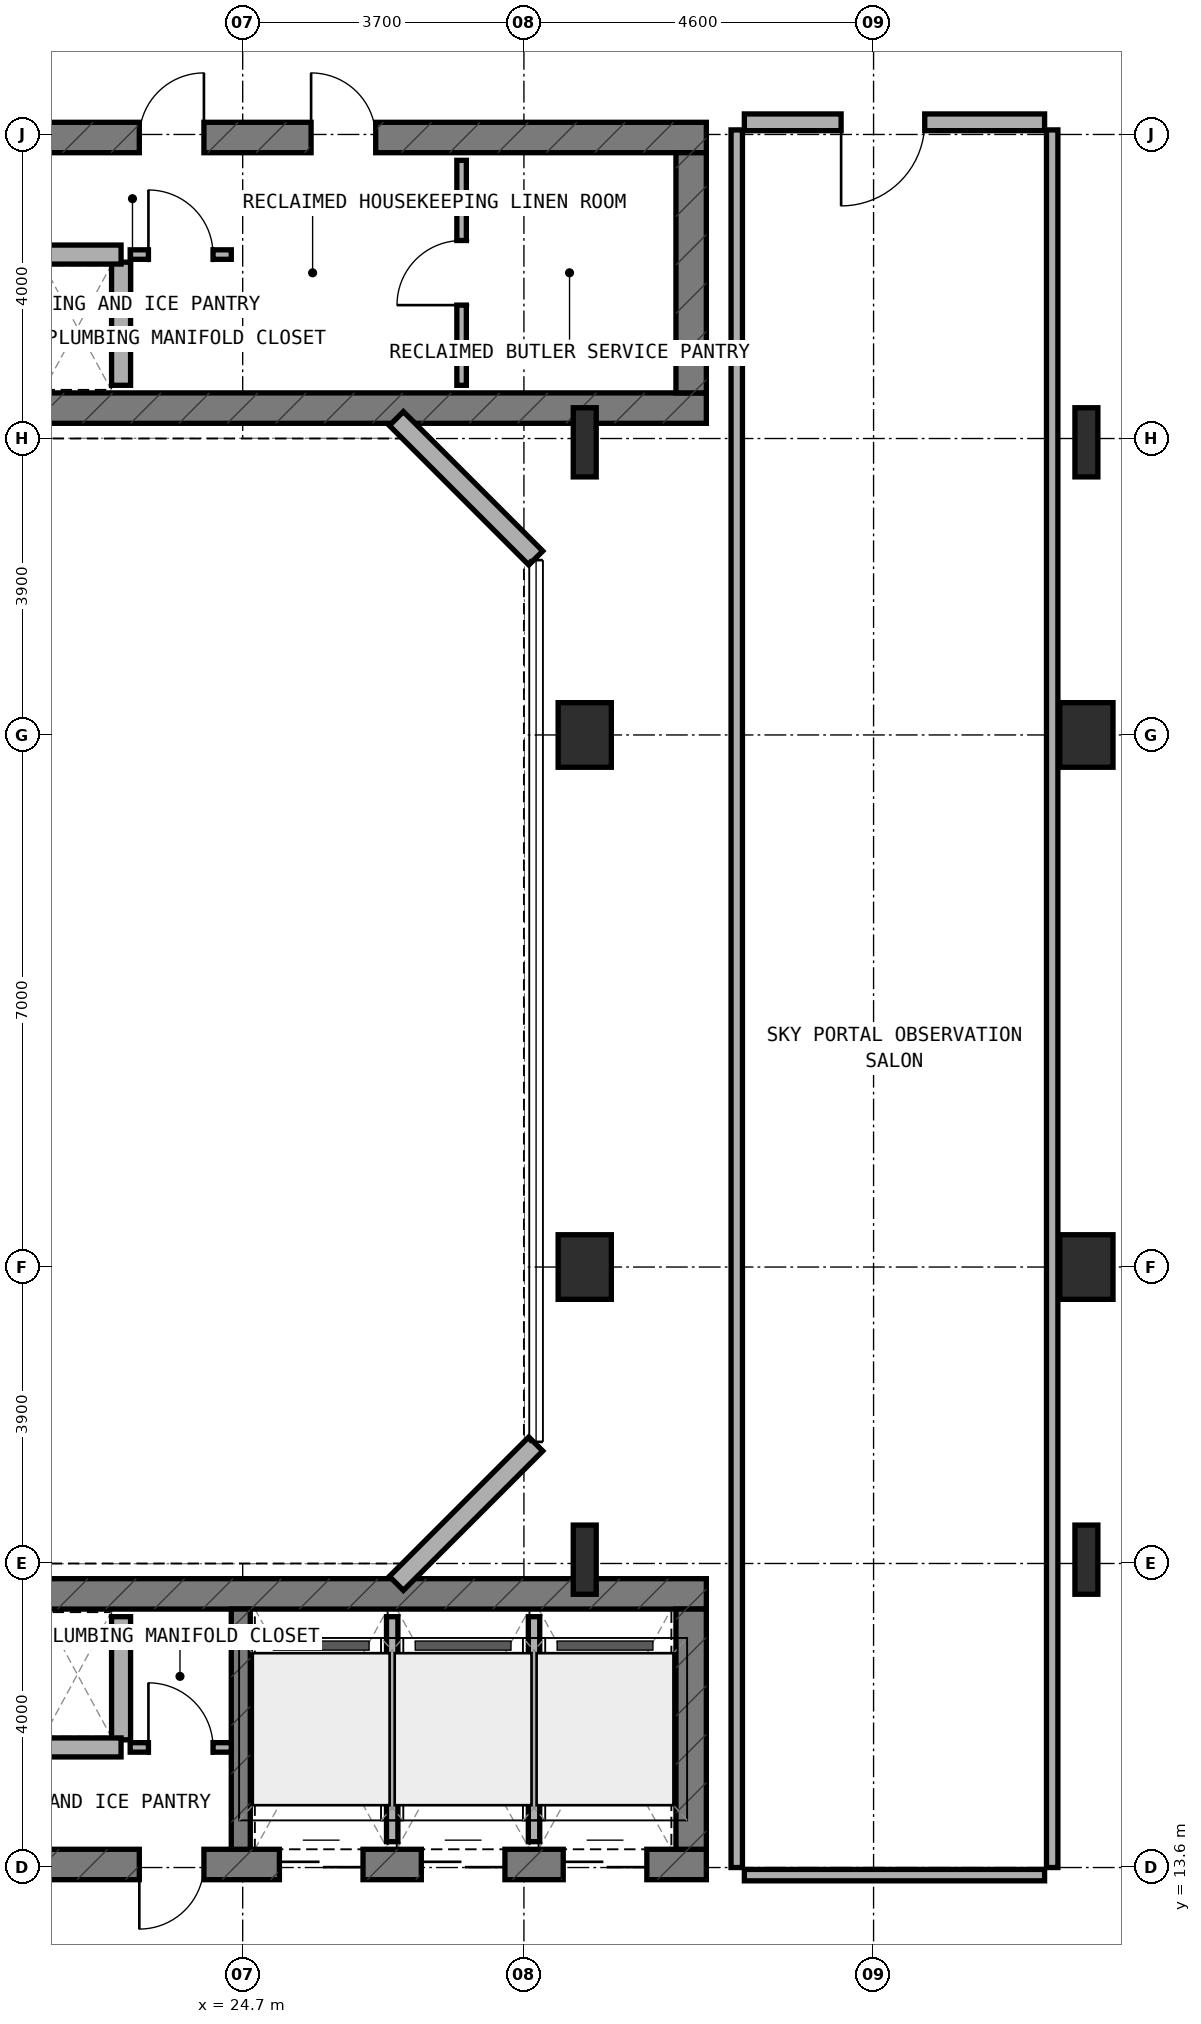
"""IFC4 building model, lengths in metres.
Left out: names, types, materials, properties, quantities, classifications, styles, units other than length and angle.
Written with IfcOpenShell. Run it as: python <this file> out.ifc"""

import sys

from ifc_helpers import new_model, si_unit, direction, frame, frame_2d, origin, origin_2d, place, context, subcontext, project, spatial, rectangle, i_section, extrude, element, fill, save


model = new_model("IFC4")
c1 = context("Model", 3, precision=1e-05, world=origin(), true_north=direction((0.0, 1.0)))
c2 = subcontext(c1, "Body", "Model", "MODEL_VIEW")
j1 = project(units=[si_unit("LENGTHUNIT", "METRE"), si_unit("PLANEANGLEUNIT", "RADIAN")], contexts=[c1])
p1 = place(None, origin())
s1 = spatial("IfcSite", under=j1, at=p1, CompositionType="ELEMENT")
p2 = place(p1, origin())
s2 = spatial("IfcBuilding", under=s1, at=p2, CompositionType="ELEMENT")
p3 = place(p2, frame((0.0, 0.0, 199.1)))
s3 = spatial("IfcBuildingStorey", under=s2, at=p3, CompositionType="ELEMENT", Elevation=199.1)
p4 = place(p3, frame((6.4, 32.8, 0.0), z_axis=(0.0, 0.0, 1.0), x_axis=(1.0, 0.0, 0.0)))
e1 = element("IfcWall", 1, at=p4, inside=s3, PredefinedType="SHEAR", context=c2, shape_type="SweptSolid", body=[
    extrude(rectangle(XDim=24.4, YDim=0.4, at=frame_2d((12.2, 0.0))), origin(), (0.0, 0.0, 1.0), 3.6),
])
p5 = place(p4, frame((6.05, 0.0, 0.0)))
e2 = element("IfcOpeningElement", 2, at=p5, cuts=e1, PredefinedType="OPENING", context=c2, shape_type="SweptSolid", body=[
    extrude(rectangle(XDim=1.1, YDim=2.15, at=frame_2d((0.55, 1.075))), frame((0.0, 0.21, 0.0), z_axis=(0.0, -1.0, 0.0), x_axis=(1.0, 0.0, 0.0)), (0.0, 0.0, 1.0), 0.42),
])
p6 = place(p3, frame((6.4, 36.36, 0.0), z_axis=(0.0, 0.0, 1.0), x_axis=(1.0, 0.0, 0.0)))
e3 = element("IfcWall", 3, at=p6, inside=s3, PredefinedType="SHEAR", context=c2, shape_type="SweptSolid", body=[
    extrude(rectangle(XDim=24.4, YDim=0.4, at=frame_2d((12.2, 0.0))), origin(), (0.0, 0.0, 1.0), 3.6),
])
p7 = place(p6, frame((9.15, 0.0, 0.0)))
e4 = element("IfcOpeningElement", 4, at=p7, cuts=e3, PredefinedType="OPENING", context=c2, shape_type="SweptSolid", body=[
    extrude(rectangle(XDim=1.2, YDim=2.15, at=frame_2d((0.6, 1.075))), frame((0.0, 0.21, 0.0), z_axis=(0.0, -1.0, 0.0), x_axis=(1.0, 0.0, 0.0)), (0.0, 0.0, 1.0), 0.42),
])
p8 = place(p6, frame((19.2, 0.0, 0.0)))
e5 = element("IfcOpeningElement", 5, at=p8, cuts=e3, PredefinedType="OPENING", context=c2, shape_type="SweptSolid", body=[
    extrude(rectangle(XDim=0.85, YDim=2.1, at=frame_2d((0.425, 1.05))), frame((0.0, 0.21, 0.0), z_axis=(0.0, -1.0, 0.0), x_axis=(1.0, 0.0, 0.0)), (0.0, 0.0, 1.0), 0.42),
])
p9 = place(p6, frame((16.94, 0.0, 0.0)))
e6 = element("IfcOpeningElement", 6, at=p9, cuts=e3, PredefinedType="OPENING", context=c2, shape_type="SweptSolid", body=[
    extrude(rectangle(XDim=0.85, YDim=2.1, at=frame_2d((0.425, 1.05))), frame((0.0, 0.21, 0.0), z_axis=(0.0, -1.0, 0.0), x_axis=(1.0, 0.0, 0.0)), (0.0, 0.0, 1.0), 0.42),
])
p10 = place(p3, frame((30.6, 33.0, 0.0), z_axis=(0.0, 0.0, 1.0), x_axis=(0.0, 1.0, 0.0)))
e7 = element("IfcWall", 7, at=p10, inside=s3, PredefinedType="SHEAR", context=c2, shape_type="SweptSolid", body=[
    extrude(rectangle(XDim=3.16, YDim=0.4, at=frame_2d((1.58, 0.0))), origin(), (0.0, 0.0, 1.0), 3.6),
])
p11 = place(p3, frame((6.4, 13.64, 0.0), z_axis=(0.0, 0.0, 1.0), x_axis=(1.0, 0.0, 0.0)))
e8 = element("IfcWall", 8, at=p11, inside=s3, PredefinedType="SHEAR", context=c2, shape_type="SweptSolid", body=[
    extrude(rectangle(XDim=24.4, YDim=0.4, at=frame_2d((12.2, 0.0))), origin(), (0.0, 0.0, 1.0), 3.6),
])
p12 = place(p11, frame((9.15, 0.0, 0.0)))
e9 = element("IfcOpeningElement", 9, at=p12, cuts=e8, PredefinedType="OPENING", context=c2, shape_type="SweptSolid", body=[
    extrude(rectangle(XDim=1.2, YDim=2.15, at=frame_2d((0.6, 1.075))), frame((0.0, 0.21, 0.0), z_axis=(0.0, -1.0, 0.0), x_axis=(1.0, 0.0, 0.0)), (0.0, 0.0, 1.0), 0.42),
])
p13 = place(p11, frame((16.94, 0.0, 0.0)))
e10 = element("IfcOpeningElement", 10, at=p13, cuts=e8, PredefinedType="OPENING", context=c2, shape_type="SweptSolid", body=[
    extrude(rectangle(XDim=0.85, YDim=2.1, at=frame_2d((0.425, 1.05))), frame((0.0, 0.21, 0.0), z_axis=(0.0, -1.0, 0.0), x_axis=(1.0, 0.0, 0.0)), (0.0, 0.0, 1.0), 0.42),
])
p14 = place(p11, frame((18.783, 0.0, 0.0)))
e11 = element("IfcOpeningElement", 11, at=p14, cuts=e8, PredefinedType="OPENING", context=c2, shape_type="SweptSolid", body=[
    extrude(rectangle(XDim=1.1, YDim=2.15, at=frame_2d((0.55, 1.075))), frame((0.0, 0.21, 0.0), z_axis=(0.0, -1.0, 0.0), x_axis=(1.0, 0.0, 0.0)), (0.0, 0.0, 1.0), 0.42),
])
p15 = place(p11, frame((20.65, 0.0, 0.0)))
e12 = element("IfcOpeningElement", 12, at=p15, cuts=e8, PredefinedType="OPENING", context=c2, shape_type="SweptSolid", body=[
    extrude(rectangle(XDim=1.1, YDim=2.15, at=frame_2d((0.55, 1.075))), frame((0.0, 0.21, 0.0), z_axis=(0.0, -1.0, 0.0), x_axis=(1.0, 0.0, 0.0)), (0.0, 0.0, 1.0), 0.42),
])
p16 = place(p11, frame((22.517, 0.0, 0.0)))
e13 = element("IfcOpeningElement", 13, at=p16, cuts=e8, PredefinedType="OPENING", context=c2, shape_type="SweptSolid", body=[
    extrude(rectangle(XDim=1.1, YDim=2.15, at=frame_2d((0.55, 1.075))), frame((0.0, 0.21, 0.0), z_axis=(0.0, -1.0, 0.0), x_axis=(1.0, 0.0, 0.0)), (0.0, 0.0, 1.0), 0.42),
])
p17 = place(p3, frame((6.4, 17.2, 0.0), z_axis=(0.0, 0.0, 1.0), x_axis=(1.0, 0.0, 0.0)))
e14 = element("IfcWall", 14, at=p17, inside=s3, PredefinedType="SHEAR", context=c2, shape_type="SweptSolid", body=[
    extrude(rectangle(XDim=24.4, YDim=0.4, at=frame_2d((12.2, 0.0))), origin(), (0.0, 0.0, 1.0), 3.6),
])
p18 = place(p3, frame((30.6, 13.84, 0.0), z_axis=(0.0, 0.0, 1.0), x_axis=(0.0, 1.0, 0.0)))
e15 = element("IfcWall", 15, at=p18, inside=s3, PredefinedType="SHEAR", context=c2, shape_type="SweptSolid", body=[
    extrude(rectangle(XDim=3.16, YDim=0.4, at=frame_2d((1.58, 0.0))), origin(), (0.0, 0.0, 1.0), 3.6),
])
p19 = place(p3, frame((24.675, 13.84, 0.0), z_axis=(0.0, 0.0, 1.0), x_axis=(0.0, 1.0, 0.0)))
e16 = element("IfcWall", 16, at=p19, inside=s3, PredefinedType="STANDARD", context=c2, shape_type="SweptSolid", body=[
    extrude(rectangle(XDim=3.16, YDim=0.25, at=frame_2d((1.58, 0.0))), origin(), (0.0, 0.0, 1.0), 3.32),
])
for number, where, z_axis, x_axis in (
    (17, (35.8, 21.5, 0.0), (0.0, 0.0, 1.0), (1.0, 0.0, 0.0)),
    (18, (35.8, 28.5, 0.0), (0.0, 0.0, 1.0), (1.0, 0.0, 0.0)),
):
    element("IfcColumn", number, at=place(p3, frame(where, z_axis=z_axis, x_axis=x_axis)), inside=s3, PredefinedType="COLUMN", context=c2, shape_type="SweptSolid", body=[
        extrude(rectangle(XDim=0.7, YDim=0.85, at=origin_2d()), origin(), (0.0, 0.0, 1.0), 3.6),
    ])
for number, where, z_axis, x_axis in (
    (19, (35.8, 17.65, 0.0), (0.0, 0.0, 1.0), (1.0, 0.0, 0.0)),
    (20, (35.8, 32.35, 0.0), (0.0, 0.0, 1.0), (1.0, 0.0, 0.0)),
    (21, (29.2, 17.65, 0.0), (0.0, 0.0, 1.0), (1.0, 0.0, 0.0)),
    (22, (29.2, 32.35, 0.0), (0.0, 0.0, 1.0), (1.0, 0.0, 0.0)),
):
    element("IfcColumn", number, at=place(p3, frame(where, z_axis=z_axis, x_axis=x_axis)), inside=s3, PredefinedType="COLUMN", context=c2, shape_type="SweptSolid", body=[
        extrude(i_section(OverallWidth=0.302, OverallDepth=0.91, WebThickness=0.021, FlangeThickness=0.04, FilletRadius=0.03, at=origin_2d()), origin(), (0.0, 0.0, 1.0), 3.6),
    ])
for number, where, z_axis, x_axis in (
    (23, (29.2, 21.5, 0.0), (0.0, 0.0, 1.0), (1.0, 0.0, 0.0)),
    (24, (29.2, 28.5, 0.0), (0.0, 0.0, 1.0), (1.0, 0.0, 0.0)),
):
    element("IfcColumn", number, at=place(p3, frame(where, z_axis=z_axis, x_axis=x_axis)), inside=s3, PredefinedType="COLUMN", context=c2, shape_type="SweptSolid", body=[
        extrude(rectangle(XDim=0.7, YDim=0.85, at=origin_2d()), origin(), (0.0, 0.0, 1.0), 3.6),
    ])
for number, where, z_axis, x_axis in (
    (25, (26.722, 17.338, 0.0), (0.0, 0.0, 1.0), (0.707, 0.707, 0.0)),
    (26, (28.556, 30.828, 0.0), (0.0, 0.0, 1.0), (-0.707, 0.707, 0.0)),
):
    element("IfcWall", number, at=place(p3, frame(where, z_axis=z_axis, x_axis=x_axis)), inside=s3, PredefinedType="STANDARD", context=c2, shape_type="SweptSolid", body=[
        extrude(rectangle(XDim=2.594, YDim=0.26, at=frame_2d((1.297, 0.0))), origin(), (0.0, 0.0, 1.0), 3.32),
    ])
p20 = place(p3, frame((27.58, 33.1, 0.0), z_axis=(0.0, 0.0, 1.0), x_axis=(0.0, 1.0, 0.0)))
e27 = element("IfcWall", 27, at=p20, inside=s3, PredefinedType="PARTITIONING", context=c2, shape_type="SweptSolid", body=[
    extrude(rectangle(XDim=2.96, YDim=0.125, at=frame_2d((1.48, 0.0))), origin(), (0.0, 0.0, 1.0), 3.32),
])
p21 = place(p20, frame((1.055, 0.0, 0.0)))
e28 = element("IfcOpeningElement", 28, at=p21, cuts=e27, PredefinedType="OPENING", context=c2, shape_type="SweptSolid", body=[
    extrude(rectangle(XDim=0.85, YDim=2.1, at=frame_2d((0.425, 1.05))), frame((0.0, 0.073, 0.0), z_axis=(0.0, -1.0, 0.0), x_axis=(1.0, 0.0, 0.0)), (0.0, 0.0, 1.0), 0.145),
])
p22 = place(p3, frame((23.1, 33.1, 0.0), z_axis=(0.0, 0.0, 1.0), x_axis=(0.0, 1.0, 0.0)))
e29 = element("IfcWall", 29, at=p22, inside=s3, PredefinedType="SOLIDWALL", context=c2, shape_type="SweptSolid", body=[
    extrude(rectangle(XDim=1.62, YDim=0.25, at=frame_2d((0.81, 0.0))), origin(), (0.0, 0.0, 1.0), 3.32),
])
p23 = place(p3, frame((21.95, 34.82, 0.0), z_axis=(0.0, 0.0, 1.0), x_axis=(1.0, 0.0, 0.0)))
e30 = element("IfcWall", 30, at=p23, inside=s3, PredefinedType="SOLIDWALL", context=c2, shape_type="SweptSolid", body=[
    extrude(rectangle(XDim=1.15, YDim=0.25, at=frame_2d((0.575, 0.0))), origin(), (0.0, 0.0, 1.0), 3.32),
])
p24 = place(p3, frame((23.22, 34.82, 0.0), z_axis=(0.0, 0.0, 1.0), x_axis=(1.0, 0.0, 0.0)))
e31 = element("IfcWall", 31, at=p24, inside=s3, PredefinedType="PARTITIONING", context=c2, shape_type="SweptSolid", body=[
    extrude(rectangle(XDim=1.33, YDim=0.125, at=frame_2d((0.665, 0.0))), origin(), (0.0, 0.0, 1.0), 3.32),
])
p25 = place(p24, frame((0.24, 0.0, 0.0)))
e32 = element("IfcOpeningElement", 32, at=p25, cuts=e31, PredefinedType="OPENING", context=c2, shape_type="SweptSolid", body=[
    extrude(rectangle(XDim=0.85, YDim=2.1, at=frame_2d((0.425, 1.05))), frame((0.0, 0.073, 0.0), z_axis=(0.0, -1.0, 0.0), x_axis=(1.0, 0.0, 0.0)), (0.0, 0.0, 1.0), 0.145),
])
p26 = place(p3, frame((23.1, 15.28, 0.0), z_axis=(0.0, 0.0, 1.0), x_axis=(0.0, 1.0, 0.0)))
e33 = element("IfcWall", 33, at=p26, inside=s3, PredefinedType="SOLIDWALL", context=c2, shape_type="SweptSolid", body=[
    extrude(rectangle(XDim=1.62, YDim=0.25, at=frame_2d((0.81, 0.0))), origin(), (0.0, 0.0, 1.0), 3.32),
])
p27 = place(p3, frame((21.95, 15.18, 0.0), z_axis=(0.0, 0.0, 1.0), x_axis=(1.0, 0.0, 0.0)))
e34 = element("IfcWall", 34, at=p27, inside=s3, PredefinedType="SOLIDWALL", context=c2, shape_type="SweptSolid", body=[
    extrude(rectangle(XDim=1.15, YDim=0.25, at=frame_2d((0.575, 0.0))), origin(), (0.0, 0.0, 1.0), 3.32),
])
p28 = place(p3, frame((23.22, 15.18, 0.0), z_axis=(0.0, 0.0, 1.0), x_axis=(1.0, 0.0, 0.0)))
e35 = element("IfcWall", 35, at=p28, inside=s3, PredefinedType="PARTITIONING", context=c2, shape_type="SweptSolid", body=[
    extrude(rectangle(XDim=1.33, YDim=0.125, at=frame_2d((0.665, 0.0))), origin(), (0.0, 0.0, 1.0), 3.32),
])
p29 = place(p28, frame((0.24, 0.0, 0.0)))
e36 = element("IfcOpeningElement", 36, at=p29, cuts=e35, PredefinedType="OPENING", context=c2, shape_type="SweptSolid", body=[
    extrude(rectangle(XDim=0.85, YDim=2.1, at=frame_2d((0.425, 1.05))), frame((0.0, 0.073, 0.0), z_axis=(0.0, -1.0, 0.0), x_axis=(1.0, 0.0, 0.0)), (0.0, 0.0, 1.0), 0.145),
])
p30 = place(p3, frame((26.667, 13.94, 0.0), z_axis=(0.0, 0.0, 1.0), x_axis=(0.0, 1.0, 0.0)))
e37 = element("IfcWall", 37, at=p30, inside=s3, PredefinedType="PARTITIONING", context=c2, shape_type="SweptSolid", body=[
    extrude(rectangle(XDim=2.96, YDim=0.15, at=frame_2d((1.48, 0.0))), origin(), (0.0, 0.0, 1.0), 3.32),
])
p31 = place(p3, frame((28.533, 13.94, 0.0), z_axis=(0.0, 0.0, 1.0), x_axis=(0.0, 1.0, 0.0)))
e38 = element("IfcWall", 38, at=p31, inside=s3, PredefinedType="PARTITIONING", context=c2, shape_type="SweptSolid", body=[
    extrude(rectangle(XDim=2.96, YDim=0.15, at=frame_2d((1.48, 0.0))), origin(), (0.0, 0.0, 1.0), 2.695),
])
for number, where, z_axis, x_axis in (
    (39, (31.2, 13.6, 0.0), (0.0, 0.0, 1.0), (0.0, 1.0, 0.0)),
    (40, (35.35, 13.6, 0.0), (0.0, 0.0, 1.0), (0.0, 1.0, 0.0)),
):
    element("IfcWall", number, at=place(p3, frame(where, z_axis=z_axis, x_axis=x_axis)), inside=s3, PredefinedType="PARTITIONING", context=c2, shape_type="SweptSolid", body=[
        extrude(rectangle(XDim=22.86, YDim=0.15, at=frame_2d((11.43, 0.0))), origin(), (0.0, 0.0, 1.0), 2.695),
    ])
p32 = place(p3, frame((31.3, 13.5, 0.0), z_axis=(0.0, 0.0, 1.0), x_axis=(1.0, 0.0, 0.0)))
e41 = element("IfcWall", 41, at=p32, inside=s3, PredefinedType="PARTITIONING", context=c2, shape_type="SweptSolid", body=[
    extrude(rectangle(XDim=3.95, YDim=0.15, at=frame_2d((1.975, 0.0))), origin(), (0.0, 0.0, 1.0), 3.015),
])
p33 = place(p3, frame((31.3, 36.56, 0.0), z_axis=(0.0, 0.0, 1.0), x_axis=(1.0, 0.0, 0.0)))
e42 = element("IfcWall", 42, at=p33, inside=s3, PredefinedType="SOLIDWALL", context=c2, shape_type="SweptSolid", body=[
    extrude(rectangle(XDim=3.95, YDim=0.22, at=frame_2d((1.975, 0.0))), origin(), (0.0, 0.0, 1.0), 2.695),
])
p34 = place(p33, frame((1.273, 0.0, 0.0)))
e43 = element("IfcOpeningElement", 43, at=p34, cuts=e42, PredefinedType="OPENING", context=c2, shape_type="SweptSolid", body=[
    extrude(rectangle(XDim=1.1, YDim=2.15, at=frame_2d((0.55, 1.075))), frame((0.0, 0.12, 0.0), z_axis=(0.0, -1.0, 0.0), x_axis=(1.0, 0.0, 0.0)), (0.0, 0.0, 1.0), 0.24),
])
p35 = place(p8, origin())
e44 = element("IfcDoor", 44, at=p35, inside=s3, OperationType="SINGLE_SWING_LEFT", PredefinedType="DOOR", context=c2, shape_type="SweptSolid", body=[
    extrude(rectangle(XDim=0.85, YDim=2.1, at=frame_2d((0.425, 1.05))), frame((0.0, 0.025, 0.0), z_axis=(0.0, -1.0, 0.0), x_axis=(1.0, 0.0, 0.0)), (0.0, 0.0, 1.0), 0.05),
])
fill(e5, e44)
p36 = place(p9, origin())
e45 = element("IfcDoor", 45, at=p36, inside=s3, OperationType="SINGLE_SWING_RIGHT", PredefinedType="DOOR", context=c2, shape_type="SweptSolid", body=[
    extrude(rectangle(XDim=0.85, YDim=2.1, at=frame_2d((0.425, 1.05))), frame((0.0, 0.025, 0.0), z_axis=(0.0, -1.0, 0.0), x_axis=(1.0, 0.0, 0.0)), (0.0, 0.0, 1.0), 0.05),
])
fill(e6, e45)
p37 = place(p13, frame((0.85, 0.0, 0.0), z_axis=(0.0, 0.0, 1.0), x_axis=(-1.0, 0.0, 0.0)))
e46 = element("IfcDoor", 46, at=p37, inside=s3, OperationType="SINGLE_SWING_RIGHT", PredefinedType="DOOR", context=c2, shape_type="SweptSolid", body=[
    extrude(rectangle(XDim=0.85, YDim=2.1, at=frame_2d((0.425, 1.05))), frame((0.0, 0.025, 0.0), z_axis=(0.0, -1.0, 0.0), x_axis=(1.0, 0.0, 0.0)), (0.0, 0.0, 1.0), 0.05),
])
fill(e10, e46)
p38 = place(p14, frame((1.1, 0.0, 0.0), z_axis=(0.0, 0.0, 1.0), x_axis=(-1.0, 0.0, 0.0)))
e47 = element("IfcDoor", 47, at=p38, inside=s3, OperationType="DOUBLE_DOOR_SLIDING", PredefinedType="DOOR", context=c2, shape_type="SweptSolid", body=[
    extrude(rectangle(XDim=1.1, YDim=2.15, at=frame_2d((0.55, 1.075))), frame((0.0, 0.025, 0.0), z_axis=(0.0, -1.0, 0.0), x_axis=(1.0, 0.0, 0.0)), (0.0, 0.0, 1.0), 0.05),
])
fill(e11, e47)
p39 = place(p15, frame((1.1, 0.0, 0.0), z_axis=(0.0, 0.0, 1.0), x_axis=(-1.0, 0.0, 0.0)))
e48 = element("IfcDoor", 48, at=p39, inside=s3, OperationType="DOUBLE_DOOR_SLIDING", PredefinedType="DOOR", context=c2, shape_type="SweptSolid", body=[
    extrude(rectangle(XDim=1.1, YDim=2.15, at=frame_2d((0.55, 1.075))), frame((0.0, 0.025, 0.0), z_axis=(0.0, -1.0, 0.0), x_axis=(1.0, 0.0, 0.0)), (0.0, 0.0, 1.0), 0.05),
])
fill(e12, e48)
p40 = place(p16, frame((1.1, 0.0, 0.0), z_axis=(0.0, 0.0, 1.0), x_axis=(-1.0, 0.0, 0.0)))
e49 = element("IfcDoor", 49, at=p40, inside=s3, OperationType="DOUBLE_DOOR_SLIDING", PredefinedType="DOOR", context=c2, shape_type="SweptSolid", body=[
    extrude(rectangle(XDim=1.1, YDim=2.15, at=frame_2d((0.55, 1.075))), frame((0.0, 0.025, 0.0), z_axis=(0.0, -1.0, 0.0), x_axis=(1.0, 0.0, 0.0)), (0.0, 0.0, 1.0), 0.05),
])
fill(e13, e49)
p41 = place(p21, origin())
e50 = element("IfcDoor", 50, at=p41, inside=s3, OperationType="SINGLE_SWING_LEFT", PredefinedType="DOOR", context=c2, shape_type="SweptSolid", body=[
    extrude(rectangle(XDim=0.85, YDim=2.1, at=frame_2d((0.425, 1.05))), frame((0.0, 0.025, 0.0), z_axis=(0.0, -1.0, 0.0), x_axis=(1.0, 0.0, 0.0)), (0.0, 0.0, 1.0), 0.05),
])
fill(e28, e50)
p42 = place(p25, origin())
e51 = element("IfcDoor", 51, at=p42, inside=s3, OperationType="SINGLE_SWING_LEFT", PredefinedType="DOOR", context=c2, shape_type="SweptSolid", body=[
    extrude(rectangle(XDim=0.85, YDim=2.1, at=frame_2d((0.425, 1.05))), frame((0.0, 0.025, 0.0), z_axis=(0.0, -1.0, 0.0), x_axis=(1.0, 0.0, 0.0)), (0.0, 0.0, 1.0), 0.05),
])
fill(e32, e51)
p43 = place(p29, origin())
e52 = element("IfcDoor", 52, at=p43, inside=s3, OperationType="SINGLE_SWING_LEFT", PredefinedType="DOOR", context=c2, shape_type="SweptSolid", body=[
    extrude(rectangle(XDim=0.85, YDim=2.1, at=frame_2d((0.425, 1.05))), frame((0.0, 0.025, 0.0), z_axis=(0.0, -1.0, 0.0), x_axis=(1.0, 0.0, 0.0)), (0.0, 0.0, 1.0), 0.05),
])
fill(e36, e52)
p44 = place(p34, frame((1.1, 0.0, 0.0), z_axis=(0.0, 0.0, 1.0), x_axis=(-1.0, 0.0, 0.0)))
e53 = element("IfcDoor", 53, at=p44, inside=s3, OperationType="SINGLE_SWING_RIGHT", PredefinedType="DOOR", context=c2, shape_type="SweptSolid", body=[
    extrude(rectangle(XDim=1.1, YDim=2.15, at=frame_2d((0.55, 1.075))), frame((0.0, 0.025, 0.0), z_axis=(0.0, -1.0, 0.0), x_axis=(1.0, 0.0, 0.0)), (0.0, 0.0, 1.0), 0.05),
])
fill(e43, e53)
save(model, sys.argv[1])
